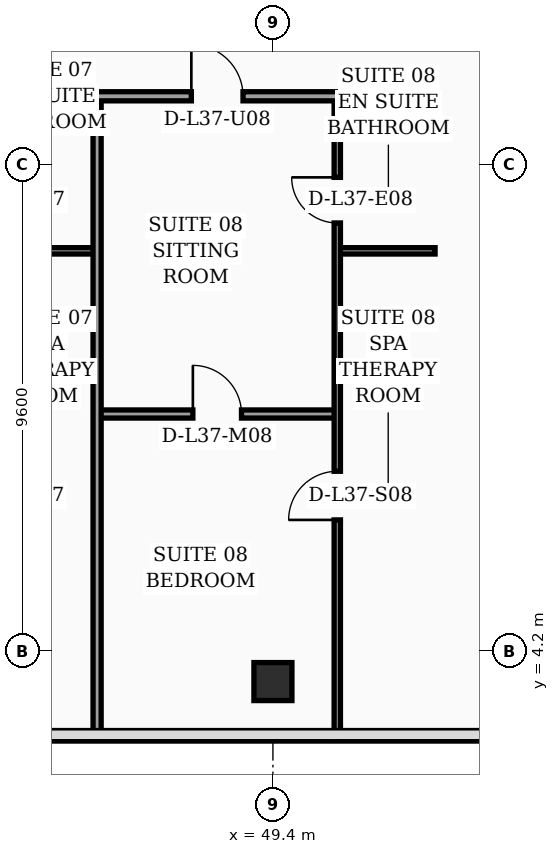
"""IFC4 building model, lengths in metres.
Left out: names, types, materials, properties, quantities, classifications, styles, units other than length and angle.
Written with IfcOpenShell. Run it as: python <this file> out.ifc"""

import sys

from ifc_helpers import new_model, si_unit, direction, frame, frame_2d, origin, origin_2d, place, context, subcontext, project, spatial, rectangle, hollow_rectangle, extrude, element, fill, save


model = new_model("IFC4")
c1 = context("Model", 3, precision=1e-05, world=origin(), true_north=direction((0.0, 1.0)))
c2 = subcontext(c1, "Body", "Model", "MODEL_VIEW")
j1 = project(units=[si_unit("LENGTHUNIT", "METRE"), si_unit("PLANEANGLEUNIT", "RADIAN")], contexts=[c1])
p1 = place(None, origin())
s1 = spatial("IfcSite", under=j1, at=p1, CompositionType="ELEMENT")
p2 = place(p1, origin())
s2 = spatial("IfcBuilding", under=s1, at=p2, CompositionType="ELEMENT")
p3 = place(p2, frame((0.0, 0.0, 152.3)))
s3 = spatial("IfcBuildingStorey", under=s2, at=p3, CompositionType="ELEMENT", Elevation=152.3)
p4 = place(p3, frame((49.4, 3.6, 0.0), z_axis=(0.0, 0.0, 1.0), x_axis=(1.0, 0.0, 0.0)))
e1 = element("IfcColumn", 1, at=p4, inside=s3, PredefinedType="COLUMN", context=c2, shape_type="SweptSolid", body=[
    extrude(hollow_rectangle(XDim=0.75, YDim=0.75, WallThickness=0.032, at=origin_2d()), origin(), (0.0, 0.0, 1.0), 3.56),
])
p5 = place(p3, frame((59.23, 5.505, 0.0), z_axis=(0.0, 0.0, 1.0), x_axis=(-0.300509063924, 0.953778958931, 0.0)))
e2 = element("IfcWall", 2, at=p5, inside=s3, PredefinedType="SOLIDWALL", context=c2, shape_type="SweptSolid", body=[
    extrude(rectangle(XDim=30.814, YDim=0.32, at=frame_2d((15.407, 0.0))), origin(), (0.0, 0.0, 1.0), 3.56),
])
p6 = place(p5, frame((10.199, 0.0, 0.0)))
e3 = element("IfcOpeningElement", 3, at=p6, cuts=e2, PredefinedType="OPENING", context=c2, shape_type="SweptSolid", body=[
    extrude(rectangle(XDim=1.4, YDim=2.25, at=frame_2d((0.7, 1.125))), frame((0.0, 0.17, 0.0), z_axis=(0.0, -1.0, 0.0), x_axis=(1.0, 0.0, 0.0)), (0.0, 0.0, 1.0), 0.34),
])
p7 = place(p5, frame((1.6, 0.0, 0.75)))
e4 = element("IfcOpeningElement", 4, at=p7, cuts=e2, PredefinedType="OPENING", context=c2, shape_type="SweptSolid", body=[
    extrude(rectangle(XDim=1.5, YDim=1.6, at=frame_2d((0.75, 0.8))), frame((0.0, 0.17, 0.0), z_axis=(0.0, -1.0, 0.0), x_axis=(1.0, 0.0, 0.0)), (0.0, 0.0, 1.0), 0.34),
])
p8 = place(p5, frame((4.7, 0.0, 0.75)))
e5 = element("IfcOpeningElement", 5, at=p8, cuts=e2, PredefinedType="OPENING", context=c2, shape_type="SweptSolid", body=[
    extrude(rectangle(XDim=1.5, YDim=1.6, at=frame_2d((0.75, 0.8))), frame((0.0, 0.17, 0.0), z_axis=(0.0, -1.0, 0.0), x_axis=(1.0, 0.0, 0.0)), (0.0, 0.0, 1.0), 0.34),
])
p9 = place(p5, frame((7.8, 0.0, 0.75)))
e6 = element("IfcOpeningElement", 6, at=p9, cuts=e2, PredefinedType="OPENING", context=c2, shape_type="SweptSolid", body=[
    extrude(rectangle(XDim=1.5, YDim=1.6, at=frame_2d((0.75, 0.8))), frame((0.0, 0.17, 0.0), z_axis=(0.0, -1.0, 0.0), x_axis=(1.0, 0.0, 0.0)), (0.0, 0.0, 1.0), 0.34),
])
p10 = place(p5, frame((14.0, 0.0, 0.75)))
e7 = element("IfcOpeningElement", 7, at=p10, cuts=e2, PredefinedType="OPENING", context=c2, shape_type="SweptSolid", body=[
    extrude(rectangle(XDim=1.5, YDim=1.6, at=frame_2d((0.75, 0.8))), frame((0.0, 0.17, 0.0), z_axis=(0.0, -1.0, 0.0), x_axis=(1.0, 0.0, 0.0)), (0.0, 0.0, 1.0), 0.34),
])
p11 = place(p5, frame((17.1, 0.0, 0.75)))
e8 = element("IfcOpeningElement", 8, at=p11, cuts=e2, PredefinedType="OPENING", context=c2, shape_type="SweptSolid", body=[
    extrude(rectangle(XDim=1.5, YDim=1.6, at=frame_2d((0.75, 0.8))), frame((0.0, 0.17, 0.0), z_axis=(0.0, -1.0, 0.0), x_axis=(1.0, 0.0, 0.0)), (0.0, 0.0, 1.0), 0.34),
])
p12 = place(p5, frame((20.2, 0.0, 0.75)))
e9 = element("IfcOpeningElement", 9, at=p12, cuts=e2, PredefinedType="OPENING", context=c2, shape_type="SweptSolid", body=[
    extrude(rectangle(XDim=1.5, YDim=1.6, at=frame_2d((0.75, 0.8))), frame((0.0, 0.17, 0.0), z_axis=(0.0, -1.0, 0.0), x_axis=(1.0, 0.0, 0.0)), (0.0, 0.0, 1.0), 0.34),
])
p13 = place(p5, frame((23.3, 0.0, 0.75)))
e10 = element("IfcOpeningElement", 10, at=p13, cuts=e2, PredefinedType="OPENING", context=c2, shape_type="SweptSolid", body=[
    extrude(rectangle(XDim=1.5, YDim=1.6, at=frame_2d((0.75, 0.8))), frame((0.0, 0.17, 0.0), z_axis=(0.0, -1.0, 0.0), x_axis=(1.0, 0.0, 0.0)), (0.0, 0.0, 1.0), 0.34),
])
p14 = place(p5, frame((26.4, 0.0, 0.75)))
e11 = element("IfcOpeningElement", 11, at=p14, cuts=e2, PredefinedType="OPENING", context=c2, shape_type="SweptSolid", body=[
    extrude(rectangle(XDim=1.5, YDim=1.6, at=frame_2d((0.75, 0.8))), frame((0.0, 0.17, 0.0), z_axis=(0.0, -1.0, 0.0), x_axis=(1.0, 0.0, 0.0)), (0.0, 0.0, 1.0), 0.34),
])
p15 = place(p3, frame((43.8, 12.1, 0.0), z_axis=(0.0, 0.0, 1.0), x_axis=(1.0, 0.0, 0.0)))
e12 = element("IfcWall", 12, at=p15, inside=s3, PredefinedType="PARTITIONING", context=c2, shape_type="SweptSolid", body=[
    extrude(rectangle(XDim=2.13, YDim=0.125, at=frame_2d((1.065, 0.0))), origin(), (0.0, 0.0, 1.0), 3.56),
])
p16 = place(p3, frame((50.67, 12.1, 0.0), z_axis=(0.0, 0.0, 1.0), x_axis=(1.0, 0.0, 0.0)))
e13 = element("IfcWall", 13, at=p16, inside=s3, PredefinedType="PARTITIONING", context=c2, shape_type="SweptSolid", body=[
    extrude(rectangle(XDim=1.93, YDim=0.125, at=frame_2d((0.965, 0.0))), origin(), (0.0, 0.0, 1.0), 3.56),
])
p17 = place(p3, frame((45.93, 8.88, 0.0), z_axis=(0.0, 0.0, 1.0), x_axis=(1.0, 0.0, 0.0)))
e14 = element("IfcWall", 14, at=p17, inside=s3, PredefinedType="PARTITIONING", context=c2, shape_type="SweptSolid", body=[
    extrude(rectangle(XDim=4.74, YDim=0.16, at=frame_2d((2.37, 0.0))), origin(), (0.0, 0.0, 1.0), 2.94),
])
p18 = place(p17, frame((1.89, 0.0, 0.0)))
e15 = element("IfcOpeningElement", 15, at=p18, cuts=e14, PredefinedType="OPENING", context=c2, shape_type="SweptSolid", body=[
    extrude(rectangle(XDim=0.96, YDim=2.2, at=frame_2d((0.48, 1.1))), frame((0.0, 0.09, 0.0), z_axis=(0.0, -1.0, 0.0), x_axis=(1.0, 0.0, 0.0)), (0.0, 0.0, 1.0), 0.18),
])
p19 = place(p3, frame((50.67, 2.44, 0.0), z_axis=(0.0, 0.0, 1.0), x_axis=(0.0, 1.0, 0.0)))
e16 = element("IfcWall", 16, at=p19, inside=s3, PredefinedType="PARTITIONING", context=c2, shape_type="SweptSolid", body=[
    extrude(rectangle(XDim=12.71, YDim=0.125, at=frame_2d((6.355, 0.0))), origin(), (0.0, 0.0, 1.0), 3.04),
])
p20 = place(p19, frame((4.35, 0.0, 0.0)))
e17 = element("IfcOpeningElement", 17, at=p20, cuts=e16, PredefinedType="OPENING", context=c2, shape_type="SweptSolid", body=[
    extrude(rectangle(XDim=0.96, YDim=2.2, at=frame_2d((0.48, 1.1))), frame((0.0, 0.073, 0.0), z_axis=(0.0, -1.0, 0.0), x_axis=(1.0, 0.0, 0.0)), (0.0, 0.0, 1.0), 0.145),
])
p21 = place(p19, frame((10.21, 0.0, 0.0)))
e18 = element("IfcOpeningElement", 18, at=p21, cuts=e16, PredefinedType="OPENING", context=c2, shape_type="SweptSolid", body=[
    extrude(rectangle(XDim=0.9, YDim=2.15, at=frame_2d((0.45, 1.075))), frame((0.0, 0.073, 0.0), z_axis=(0.0, -1.0, 0.0), x_axis=(1.0, 0.0, 0.0)), (0.0, 0.0, 1.0), 0.145),
])
p22 = place(p3, frame((45.93, 2.44, 0.0), z_axis=(0.0, 0.0, 1.0), x_axis=(0.0, 1.0, 0.0)))
e19 = element("IfcWall", 19, at=p22, inside=s3, PredefinedType="PARTITIONING", context=c2, shape_type="SweptSolid", body=[
    extrude(rectangle(XDim=12.71, YDim=0.16, at=frame_2d((6.355, 0.0))), origin(), (0.0, 0.0, 1.0), 3.04),
])
p23 = place(p3, frame((32.4, 15.15, 0.0), z_axis=(0.0, 0.0, 1.0), x_axis=(1.0, 0.0, 0.0)))
e20 = element("IfcWall", 20, at=p23, inside=s3, PredefinedType="PARTITIONING", context=c2, shape_type="SweptSolid", body=[
    extrude(rectangle(XDim=20.2, YDim=0.18, at=frame_2d((10.1, 0.0))), origin(), (0.0, 0.0, 1.0), 2.94),
])
p24 = place(p23, frame((1.64, 0.0, 0.0)))
e21 = element("IfcOpeningElement", 21, at=p24, cuts=e20, PredefinedType="OPENING", context=c2, shape_type="SweptSolid", body=[
    extrude(rectangle(XDim=1.02, YDim=2.2, at=frame_2d((0.51, 1.1))), frame((0.0, 0.1, 0.0), z_axis=(0.0, -1.0, 0.0), x_axis=(1.0, 0.0, 0.0)), (0.0, 0.0, 1.0), 0.2),
])
p25 = place(p23, frame((8.2, 0.0, 0.0)))
e22 = element("IfcOpeningElement", 22, at=p25, cuts=e20, PredefinedType="OPENING", context=c2, shape_type="SweptSolid", body=[
    extrude(rectangle(XDim=1.02, YDim=2.2, at=frame_2d((0.51, 1.1))), frame((0.0, 0.1, 0.0), z_axis=(0.0, -1.0, 0.0), x_axis=(1.0, 0.0, 0.0)), (0.0, 0.0, 1.0), 0.2),
])
p26 = place(p23, frame((15.39, 0.0, 0.0)))
e23 = element("IfcOpeningElement", 23, at=p26, cuts=e20, PredefinedType="OPENING", context=c2, shape_type="SweptSolid", body=[
    extrude(rectangle(XDim=1.02, YDim=2.2, at=frame_2d((0.51, 1.1))), frame((0.0, 0.1, 0.0), z_axis=(0.0, -1.0, 0.0), x_axis=(1.0, 0.0, 0.0)), (0.0, 0.0, 1.0), 0.2),
])
p27 = place(p18, origin())
e24 = element("IfcDoor", 24, at=p27, inside=s3, OperationType="SINGLE_SWING_LEFT", PredefinedType="DOOR", context=c2, shape_type="SweptSolid", body=[
    extrude(rectangle(XDim=0.96, YDim=2.2, at=frame_2d((0.48, 1.1))), frame((0.0, 0.025, 0.0), z_axis=(0.0, -1.0, 0.0), x_axis=(1.0, 0.0, 0.0)), (0.0, 0.0, 1.0), 0.05),
])
fill(e15, e24)
p28 = place(p20, origin())
e25 = element("IfcDoor", 25, at=p28, inside=s3, OperationType="SINGLE_SWING_LEFT", PredefinedType="DOOR", context=c2, shape_type="SweptSolid", body=[
    extrude(rectangle(XDim=0.96, YDim=2.2, at=frame_2d((0.48, 1.1))), frame((0.0, 0.025, 0.0), z_axis=(0.0, -1.0, 0.0), x_axis=(1.0, 0.0, 0.0)), (0.0, 0.0, 1.0), 0.05),
])
fill(e17, e25)
p29 = place(p21, origin())
e26 = element("IfcDoor", 26, at=p29, inside=s3, OperationType="SINGLE_SWING_RIGHT", PredefinedType="DOOR", context=c2, shape_type="SweptSolid", body=[
    extrude(rectangle(XDim=0.9, YDim=2.15, at=frame_2d((0.45, 1.075))), frame((0.0, 0.025, 0.0), z_axis=(0.0, -1.0, 0.0), x_axis=(1.0, 0.0, 0.0)), (0.0, 0.0, 1.0), 0.05),
])
fill(e18, e26)
p30 = place(p26, origin())
e27 = element("IfcDoor", 27, at=p30, inside=s3, OperationType="SINGLE_SWING_LEFT", PredefinedType="DOOR", context=c2, shape_type="SweptSolid", body=[
    extrude(rectangle(XDim=1.02, YDim=2.2, at=frame_2d((0.51, 1.1))), frame((0.0, 0.025, 0.0), z_axis=(0.0, -1.0, 0.0), x_axis=(1.0, 0.0, 0.0)), (0.0, 0.0, 1.0), 0.05),
])
fill(e23, e27)
save(model, sys.argv[1])
